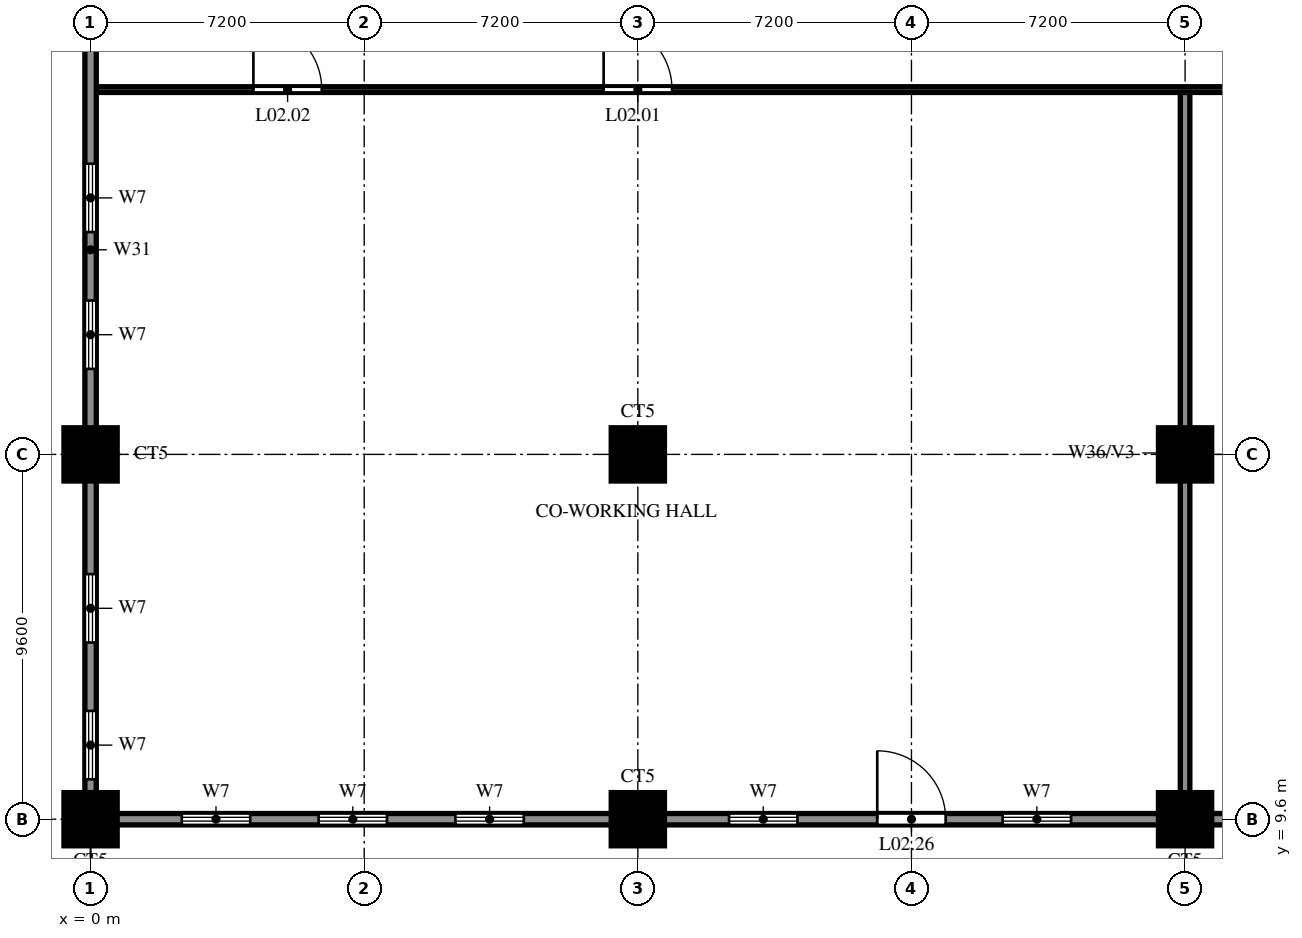
"""IFC4 building model, lengths in metres.
Left out: names, types, materials, properties, quantities, classifications, styles, units other than length and angle.
Written with IfcOpenShell. Run it as: python <this file> out.ifc"""

import sys

from ifc_helpers import new_model, si_unit, direction, frame, frame_2d, origin, origin_2d, place, context, subcontext, project, spatial, rectangle, circle, extrude, source, transform, mapped, element, fill, save


model = new_model("IFC4")
c1 = context("Model", 3, precision=1e-05, world=origin(), true_north=direction((0.0, 1.0)))
c2 = subcontext(c1, "Body", "Model", "MODEL_VIEW")
j1 = project(units=[si_unit("LENGTHUNIT", "METRE"), si_unit("PLANEANGLEUNIT", "RADIAN")], contexts=[c1])
p1 = place(None, origin())
s1 = spatial("IfcSite", under=j1, at=p1, CompositionType="ELEMENT")
p2 = place(p1, origin())
s2 = spatial("IfcBuilding", under=s1, at=p2, CompositionType="ELEMENT")
p3 = place(p2, frame((0.0, 0.0, 13.2)))
s3 = spatial("IfcBuildingStorey", under=s2, at=p3, CompositionType="ELEMENT", Elevation=13.2)
m1 = source(origin(), c2, "Body", "SweptSolid", [
    extrude(circle(Radius=0.7, at=origin_2d()), origin(), (0.0, 0.0, 1.0), 3.8),
])
for number, where, z_axis, x_axis in (
    (1, (0.0, 9.6, 0.0), (0.0, 0.0, 1.0), (1.0, 0.0, 0.0)),
    (2, (14.4, 9.6, 0.0), (0.0, 0.0, 1.0), (1.0, 0.0, 0.0)),
    (3, (28.8, 9.6, 0.0), (0.0, 0.0, 1.0), (1.0, 0.0, 0.0)),
    (4, (0.0, 19.2, 0.0), (0.0, 0.0, 1.0), (1.0, 0.0, 0.0)),
    (5, (14.4, 19.2, 0.0), (0.0, 0.0, 1.0), (1.0, 0.0, 0.0)),
    (6, (28.8, 19.2, 0.0), (0.0, 0.0, 1.0), (1.0, 0.0, 0.0)),
):
    element("IfcColumn", number, at=place(p3, frame(where, z_axis=z_axis, x_axis=x_axis)), inside=s3, PredefinedType="COLUMN", context=c2, shape_type="MappedRepresentation", body=[
        mapped(m1, transform((0.0, 0.0, 0.0))),
    ])
p4 = place(p3, frame((0.0, 9.6, 0.0), z_axis=(0.0, 0.0, 1.0), x_axis=(1.0, 0.0, 0.0)))
e7 = element("IfcWall", 7, at=p4, inside=s3, PredefinedType="SOLIDWALL", context=c2, shape_type="SweptSolid", body=[
    extrude(rectangle(XDim=100.8, YDim=0.3, at=frame_2d((50.4, 0.0))), origin(), (0.0, 0.0, 1.0), 3.8),
])
p5 = place(p4, frame((20.7, 0.0, 0.0)))
e8 = element("IfcOpeningElement", 8, at=p5, cuts=e7, PredefinedType="OPENING", context=c2, shape_type="SweptSolid", body=[
    extrude(rectangle(XDim=1.8, YDim=2.1, at=frame_2d((0.9, 1.05))), frame((0.0, 0.16, 0.0), z_axis=(0.0, -1.0, 0.0), x_axis=(1.0, 0.0, 0.0)), (0.0, 0.0, 1.0), 0.32),
])
p6 = place(p4, frame((49.2, 0.0, 0.0)))
e9 = element("IfcOpeningElement", 9, at=p6, cuts=e7, PredefinedType="OPENING", context=c2, shape_type="SweptSolid", body=[
    extrude(rectangle(XDim=2.4, YDim=2.1, at=frame_2d((1.2, 1.05))), frame((0.0, 0.16, 0.0), z_axis=(0.0, -1.0, 0.0), x_axis=(1.0, 0.0, 0.0)), (0.0, 0.0, 1.0), 0.32),
])
p7 = place(p4, frame((78.3, 0.0, 0.0)))
e10 = element("IfcOpeningElement", 10, at=p7, cuts=e7, PredefinedType="OPENING", context=c2, shape_type="SweptSolid", body=[
    extrude(rectangle(XDim=1.8, YDim=2.1, at=frame_2d((0.9, 1.05))), frame((0.0, 0.16, 0.0), z_axis=(0.0, -1.0, 0.0), x_axis=(1.0, 0.0, 0.0)), (0.0, 0.0, 1.0), 0.32),
])
p8 = place(p4, frame((2.4, 0.0, 0.6)))
e11 = element("IfcOpeningElement", 11, at=p8, cuts=e7, PredefinedType="OPENING", context=c2, shape_type="SweptSolid", body=[
    extrude(rectangle(XDim=1.8, YDim=2.4, at=frame_2d((0.9, 1.2))), frame((0.0, 0.16, 0.0), z_axis=(0.0, -1.0, 0.0), x_axis=(1.0, 0.0, 0.0)), (0.0, 0.0, 1.0), 0.32),
])
p9 = place(p4, frame((6.0, 0.0, 0.6)))
e12 = element("IfcOpeningElement", 12, at=p9, cuts=e7, PredefinedType="OPENING", context=c2, shape_type="SweptSolid", body=[
    extrude(rectangle(XDim=1.8, YDim=2.4, at=frame_2d((0.9, 1.2))), frame((0.0, 0.16, 0.0), z_axis=(0.0, -1.0, 0.0), x_axis=(1.0, 0.0, 0.0)), (0.0, 0.0, 1.0), 0.32),
])
p10 = place(p4, frame((9.6, 0.0, 0.6)))
e13 = element("IfcOpeningElement", 13, at=p10, cuts=e7, PredefinedType="OPENING", context=c2, shape_type="SweptSolid", body=[
    extrude(rectangle(XDim=1.8, YDim=2.4, at=frame_2d((0.9, 1.2))), frame((0.0, 0.16, 0.0), z_axis=(0.0, -1.0, 0.0), x_axis=(1.0, 0.0, 0.0)), (0.0, 0.0, 1.0), 0.32),
])
p11 = place(p4, frame((16.8, 0.0, 0.6)))
e14 = element("IfcOpeningElement", 14, at=p11, cuts=e7, PredefinedType="OPENING", context=c2, shape_type="SweptSolid", body=[
    extrude(rectangle(XDim=1.8, YDim=2.4, at=frame_2d((0.9, 1.2))), frame((0.0, 0.16, 0.0), z_axis=(0.0, -1.0, 0.0), x_axis=(1.0, 0.0, 0.0)), (0.0, 0.0, 1.0), 0.32),
])
p12 = place(p4, frame((24.0, 0.0, 0.6)))
e15 = element("IfcOpeningElement", 15, at=p12, cuts=e7, PredefinedType="OPENING", context=c2, shape_type="SweptSolid", body=[
    extrude(rectangle(XDim=1.8, YDim=2.4, at=frame_2d((0.9, 1.2))), frame((0.0, 0.16, 0.0), z_axis=(0.0, -1.0, 0.0), x_axis=(1.0, 0.0, 0.0)), (0.0, 0.0, 1.0), 0.32),
])
p13 = place(p4, frame((31.2, 0.0, 0.6)))
e16 = element("IfcOpeningElement", 16, at=p13, cuts=e7, PredefinedType="OPENING", context=c2, shape_type="SweptSolid", body=[
    extrude(rectangle(XDim=1.8, YDim=2.4, at=frame_2d((0.9, 1.2))), frame((0.0, 0.16, 0.0), z_axis=(0.0, -1.0, 0.0), x_axis=(1.0, 0.0, 0.0)), (0.0, 0.0, 1.0), 0.32),
])
p14 = place(p4, frame((34.8, 0.0, 0.6)))
e17 = element("IfcOpeningElement", 17, at=p14, cuts=e7, PredefinedType="OPENING", context=c2, shape_type="SweptSolid", body=[
    extrude(rectangle(XDim=1.8, YDim=2.4, at=frame_2d((0.9, 1.2))), frame((0.0, 0.16, 0.0), z_axis=(0.0, -1.0, 0.0), x_axis=(1.0, 0.0, 0.0)), (0.0, 0.0, 1.0), 0.32),
])
p15 = place(p4, frame((38.4, 0.0, 0.6)))
e18 = element("IfcOpeningElement", 18, at=p15, cuts=e7, PredefinedType="OPENING", context=c2, shape_type="SweptSolid", body=[
    extrude(rectangle(XDim=1.8, YDim=2.4, at=frame_2d((0.9, 1.2))), frame((0.0, 0.16, 0.0), z_axis=(0.0, -1.0, 0.0), x_axis=(1.0, 0.0, 0.0)), (0.0, 0.0, 1.0), 0.32),
])
p16 = place(p4, frame((45.6, 0.0, 0.6)))
e19 = element("IfcOpeningElement", 19, at=p16, cuts=e7, PredefinedType="OPENING", context=c2, shape_type="SweptSolid", body=[
    extrude(rectangle(XDim=1.8, YDim=2.4, at=frame_2d((0.9, 1.2))), frame((0.0, 0.16, 0.0), z_axis=(0.0, -1.0, 0.0), x_axis=(1.0, 0.0, 0.0)), (0.0, 0.0, 1.0), 0.32),
])
p17 = place(p4, frame((52.8, 0.0, 0.6)))
e20 = element("IfcOpeningElement", 20, at=p17, cuts=e7, PredefinedType="OPENING", context=c2, shape_type="SweptSolid", body=[
    extrude(rectangle(XDim=1.8, YDim=2.4, at=frame_2d((0.9, 1.2))), frame((0.0, 0.16, 0.0), z_axis=(0.0, -1.0, 0.0), x_axis=(1.0, 0.0, 0.0)), (0.0, 0.0, 1.0), 0.32),
])
p18 = place(p4, frame((60.0, 0.0, 0.6)))
e21 = element("IfcOpeningElement", 21, at=p18, cuts=e7, PredefinedType="OPENING", context=c2, shape_type="SweptSolid", body=[
    extrude(rectangle(XDim=1.8, YDim=2.4, at=frame_2d((0.9, 1.2))), frame((0.0, 0.16, 0.0), z_axis=(0.0, -1.0, 0.0), x_axis=(1.0, 0.0, 0.0)), (0.0, 0.0, 1.0), 0.32),
])
p19 = place(p4, frame((63.6, 0.0, 0.6)))
e22 = element("IfcOpeningElement", 22, at=p19, cuts=e7, PredefinedType="OPENING", context=c2, shape_type="SweptSolid", body=[
    extrude(rectangle(XDim=1.8, YDim=2.4, at=frame_2d((0.9, 1.2))), frame((0.0, 0.16, 0.0), z_axis=(0.0, -1.0, 0.0), x_axis=(1.0, 0.0, 0.0)), (0.0, 0.0, 1.0), 0.32),
])
p20 = place(p4, frame((67.2, 0.0, 0.6)))
e23 = element("IfcOpeningElement", 23, at=p20, cuts=e7, PredefinedType="OPENING", context=c2, shape_type="SweptSolid", body=[
    extrude(rectangle(XDim=1.8, YDim=2.4, at=frame_2d((0.9, 1.2))), frame((0.0, 0.16, 0.0), z_axis=(0.0, -1.0, 0.0), x_axis=(1.0, 0.0, 0.0)), (0.0, 0.0, 1.0), 0.32),
])
p21 = place(p4, frame((74.4, 0.0, 0.6)))
e24 = element("IfcOpeningElement", 24, at=p21, cuts=e7, PredefinedType="OPENING", context=c2, shape_type="SweptSolid", body=[
    extrude(rectangle(XDim=1.8, YDim=2.4, at=frame_2d((0.9, 1.2))), frame((0.0, 0.16, 0.0), z_axis=(0.0, -1.0, 0.0), x_axis=(1.0, 0.0, 0.0)), (0.0, 0.0, 1.0), 0.32),
])
p22 = place(p4, frame((81.6, 0.0, 0.6)))
e25 = element("IfcOpeningElement", 25, at=p22, cuts=e7, PredefinedType="OPENING", context=c2, shape_type="SweptSolid", body=[
    extrude(rectangle(XDim=1.8, YDim=2.4, at=frame_2d((0.9, 1.2))), frame((0.0, 0.16, 0.0), z_axis=(0.0, -1.0, 0.0), x_axis=(1.0, 0.0, 0.0)), (0.0, 0.0, 1.0), 0.32),
])
p23 = place(p4, frame((88.8, 0.0, 0.6)))
e26 = element("IfcOpeningElement", 26, at=p23, cuts=e7, PredefinedType="OPENING", context=c2, shape_type="SweptSolid", body=[
    extrude(rectangle(XDim=1.8, YDim=2.4, at=frame_2d((0.9, 1.2))), frame((0.0, 0.16, 0.0), z_axis=(0.0, -1.0, 0.0), x_axis=(1.0, 0.0, 0.0)), (0.0, 0.0, 1.0), 0.32),
])
p24 = place(p4, frame((92.4, 0.0, 0.6)))
e27 = element("IfcOpeningElement", 27, at=p24, cuts=e7, PredefinedType="OPENING", context=c2, shape_type="SweptSolid", body=[
    extrude(rectangle(XDim=1.8, YDim=2.4, at=frame_2d((0.9, 1.2))), frame((0.0, 0.16, 0.0), z_axis=(0.0, -1.0, 0.0), x_axis=(1.0, 0.0, 0.0)), (0.0, 0.0, 1.0), 0.32),
])
p25 = place(p4, frame((96.0, 0.0, 0.6)))
e28 = element("IfcOpeningElement", 28, at=p25, cuts=e7, PredefinedType="OPENING", context=c2, shape_type="SweptSolid", body=[
    extrude(rectangle(XDim=1.8, YDim=2.4, at=frame_2d((0.9, 1.2))), frame((0.0, 0.16, 0.0), z_axis=(0.0, -1.0, 0.0), x_axis=(1.0, 0.0, 0.0)), (0.0, 0.0, 1.0), 0.32),
])
p26 = place(p3, frame((0.15, 28.8, 0.0), z_axis=(0.0, 0.0, 1.0), x_axis=(1.0, 0.0, 0.0)))
e29 = element("IfcWall", 29, at=p26, inside=s3, PredefinedType="PARTITIONING", context=c2, shape_type="SweptSolid", body=[
    extrude(rectangle(XDim=100.5, YDim=0.15, at=frame_2d((50.25, 0.0))), origin(), (0.0, 0.0, 1.0), 2.6),
])
p27 = place(p26, frame((13.35, 0.0, 0.0)))
e30 = element("IfcOpeningElement", 30, at=p27, cuts=e29, PredefinedType="OPENING", context=c2, shape_type="SweptSolid", body=[
    extrude(rectangle(XDim=1.8, YDim=2.1, at=frame_2d((0.9, 1.05))), frame((0.0, 0.085, 0.0), z_axis=(0.0, -1.0, 0.0), x_axis=(1.0, 0.0, 0.0)), (0.0, 0.0, 1.0), 0.17),
])
p28 = place(p26, frame((4.134, 0.0, 0.0)))
e31 = element("IfcOpeningElement", 31, at=p28, cuts=e29, PredefinedType="OPENING", context=c2, shape_type="SweptSolid", body=[
    extrude(rectangle(XDim=1.8, YDim=2.1, at=frame_2d((0.9, 1.05))), frame((0.0, 0.085, 0.0), z_axis=(0.0, -1.0, 0.0), x_axis=(1.0, 0.0, 0.0)), (0.0, 0.0, 1.0), 0.17),
])
p29 = place(p26, frame((34.95, 0.0, 0.0)))
e32 = element("IfcOpeningElement", 32, at=p29, cuts=e29, PredefinedType="OPENING", context=c2, shape_type="SweptSolid", body=[
    extrude(rectangle(XDim=1.8, YDim=2.1, at=frame_2d((0.9, 1.05))), frame((0.0, 0.085, 0.0), z_axis=(0.0, -1.0, 0.0), x_axis=(1.0, 0.0, 0.0)), (0.0, 0.0, 1.0), 0.17),
])
p30 = place(p26, frame((30.342, 0.0, 0.0)))
e33 = element("IfcOpeningElement", 33, at=p30, cuts=e29, PredefinedType="OPENING", context=c2, shape_type="SweptSolid", body=[
    extrude(rectangle(XDim=1.8, YDim=2.1, at=frame_2d((0.9, 1.05))), frame((0.0, 0.085, 0.0), z_axis=(0.0, -1.0, 0.0), x_axis=(1.0, 0.0, 0.0)), (0.0, 0.0, 1.0), 0.17),
])
p31 = place(p26, frame((56.55, 0.0, 0.0)))
e34 = element("IfcOpeningElement", 34, at=p31, cuts=e29, PredefinedType="OPENING", context=c2, shape_type="SweptSolid", body=[
    extrude(rectangle(XDim=1.8, YDim=2.1, at=frame_2d((0.9, 1.05))), frame((0.0, 0.085, 0.0), z_axis=(0.0, -1.0, 0.0), x_axis=(1.0, 0.0, 0.0)), (0.0, 0.0, 1.0), 0.17),
])
p32 = place(p26, frame((47.334, 0.0, 0.0)))
e35 = element("IfcOpeningElement", 35, at=p32, cuts=e29, PredefinedType="OPENING", context=c2, shape_type="SweptSolid", body=[
    extrude(rectangle(XDim=1.8, YDim=2.1, at=frame_2d((0.9, 1.05))), frame((0.0, 0.085, 0.0), z_axis=(0.0, -1.0, 0.0), x_axis=(1.0, 0.0, 0.0)), (0.0, 0.0, 1.0), 0.17),
])
p33 = place(p26, frame((85.35, 0.0, 0.0)))
e36 = element("IfcOpeningElement", 36, at=p33, cuts=e29, PredefinedType="OPENING", context=c2, shape_type="SweptSolid", body=[
    extrude(rectangle(XDim=1.8, YDim=2.1, at=frame_2d((0.9, 1.05))), frame((0.0, 0.085, 0.0), z_axis=(0.0, -1.0, 0.0), x_axis=(1.0, 0.0, 0.0)), (0.0, 0.0, 1.0), 0.17),
])
p34 = place(p26, frame((76.134, 0.0, 0.0)))
e37 = element("IfcOpeningElement", 37, at=p34, cuts=e29, PredefinedType="OPENING", context=c2, shape_type="SweptSolid", body=[
    extrude(rectangle(XDim=1.8, YDim=2.1, at=frame_2d((0.9, 1.05))), frame((0.0, 0.085, 0.0), z_axis=(0.0, -1.0, 0.0), x_axis=(1.0, 0.0, 0.0)), (0.0, 0.0, 1.0), 0.17),
])
p35 = place(p3, frame((0.0, 9.6, 0.0), z_axis=(0.0, 0.0, 1.0), x_axis=(0.0, 1.0, 0.0)))
e38 = element("IfcWall", 38, at=p35, inside=s3, PredefinedType="SOLIDWALL", context=c2, shape_type="SweptSolid", body=[
    extrude(rectangle(XDim=33.3, YDim=0.3, at=frame_2d((16.65, 0.0))), origin(), (0.0, 0.0, 1.0), 3.8),
])
p36 = place(p35, frame((1.05, 0.0, 0.6)))
e39 = element("IfcOpeningElement", 39, at=p36, cuts=e38, PredefinedType="OPENING", context=c2, shape_type="SweptSolid", body=[
    extrude(rectangle(XDim=1.8, YDim=2.4, at=frame_2d((0.9, 1.2))), frame((0.0, 0.16, 0.0), z_axis=(0.0, -1.0, 0.0), x_axis=(1.0, 0.0, 0.0)), (0.0, 0.0, 1.0), 0.32),
])
p37 = place(p35, frame((4.65, 0.0, 0.6)))
e40 = element("IfcOpeningElement", 40, at=p37, cuts=e38, PredefinedType="OPENING", context=c2, shape_type="SweptSolid", body=[
    extrude(rectangle(XDim=1.8, YDim=2.4, at=frame_2d((0.9, 1.2))), frame((0.0, 0.16, 0.0), z_axis=(0.0, -1.0, 0.0), x_axis=(1.0, 0.0, 0.0)), (0.0, 0.0, 1.0), 0.32),
])
p38 = place(p35, frame((11.85, 0.0, 0.6)))
e41 = element("IfcOpeningElement", 41, at=p38, cuts=e38, PredefinedType="OPENING", context=c2, shape_type="SweptSolid", body=[
    extrude(rectangle(XDim=1.8, YDim=2.4, at=frame_2d((0.9, 1.2))), frame((0.0, 0.16, 0.0), z_axis=(0.0, -1.0, 0.0), x_axis=(1.0, 0.0, 0.0)), (0.0, 0.0, 1.0), 0.32),
])
p39 = place(p35, frame((15.45, 0.0, 0.6)))
e42 = element("IfcOpeningElement", 42, at=p39, cuts=e38, PredefinedType="OPENING", context=c2, shape_type="SweptSolid", body=[
    extrude(rectangle(XDim=1.8, YDim=2.4, at=frame_2d((0.9, 1.2))), frame((0.0, 0.16, 0.0), z_axis=(0.0, -1.0, 0.0), x_axis=(1.0, 0.0, 0.0)), (0.0, 0.0, 1.0), 0.32),
])
p40 = place(p35, frame((26.25, 0.0, 0.6)))
e43 = element("IfcOpeningElement", 43, at=p40, cuts=e38, PredefinedType="OPENING", context=c2, shape_type="SweptSolid", body=[
    extrude(rectangle(XDim=1.8, YDim=2.4, at=frame_2d((0.9, 1.2))), frame((0.0, 0.16, 0.0), z_axis=(0.0, -1.0, 0.0), x_axis=(1.0, 0.0, 0.0)), (0.0, 0.0, 1.0), 0.32),
])
p41 = place(p35, frame((29.85, 0.0, 0.6)))
e44 = element("IfcOpeningElement", 44, at=p41, cuts=e38, PredefinedType="OPENING", context=c2, shape_type="SweptSolid", body=[
    extrude(rectangle(XDim=1.8, YDim=2.4, at=frame_2d((0.9, 1.2))), frame((0.0, 0.16, 0.0), z_axis=(0.0, -1.0, 0.0), x_axis=(1.0, 0.0, 0.0)), (0.0, 0.0, 1.0), 0.32),
])
p42 = place(p3, frame((28.8, 9.75, 0.0), z_axis=(0.0, 0.0, 1.0), x_axis=(0.0, 1.0, 0.0)))
e45 = element("IfcWall", 45, at=p42, inside=s3, PredefinedType="SOLIDWALL", context=c2, shape_type="SweptSolid", body=[
    extrude(rectangle(XDim=18.975, YDim=0.25, at=frame_2d((9.488, 0.0))), origin(), (0.0, 0.0, 1.0), 2.6),
])
p43 = place(p27, origin())
e46 = element("IfcDoor", 46, at=p43, inside=s3, OperationType="DOUBLE_DOOR_SINGLE_SWING", PredefinedType="DOOR", context=c2, shape_type="SweptSolid", body=[
    extrude(rectangle(XDim=1.8, YDim=2.1, at=frame_2d((0.9, 1.05))), frame((0.0, 0.025, 0.0), z_axis=(0.0, -1.0, 0.0), x_axis=(1.0, 0.0, 0.0)), (0.0, 0.0, 1.0), 0.05),
])
fill(e30, e46)
p44 = place(p28, origin())
e47 = element("IfcDoor", 47, at=p44, inside=s3, OperationType="DOUBLE_DOOR_SINGLE_SWING", PredefinedType="DOOR", context=c2, shape_type="SweptSolid", body=[
    extrude(rectangle(XDim=1.8, YDim=2.1, at=frame_2d((0.9, 1.05))), frame((0.0, 0.025, 0.0), z_axis=(0.0, -1.0, 0.0), x_axis=(1.0, 0.0, 0.0)), (0.0, 0.0, 1.0), 0.05),
])
fill(e31, e47)
p45 = place(p5, origin())
e48 = element("IfcDoor", 48, at=p45, inside=s3, OperationType="DOUBLE_DOOR_SINGLE_SWING", PredefinedType="DOOR", context=c2, shape_type="SweptSolid", body=[
    extrude(rectangle(XDim=1.8, YDim=2.1, at=frame_2d((0.9, 1.05))), frame((0.0, 0.025, 0.0), z_axis=(0.0, -1.0, 0.0), x_axis=(1.0, 0.0, 0.0)), (0.0, 0.0, 1.0), 0.05),
])
fill(e8, e48)
p46 = place(p8, origin())
e49 = element("IfcWindow", 49, at=p46, inside=s3, PartitioningType="DOUBLE_PANEL_VERTICAL", PredefinedType="WINDOW", context=c2, shape_type="SweptSolid", body=[
    extrude(rectangle(XDim=1.8, YDim=2.4, at=frame_2d((0.9, 1.2))), frame((0.0, 0.03, 0.0), z_axis=(0.0, -1.0, 0.0), x_axis=(1.0, 0.0, 0.0)), (0.0, 0.0, 1.0), 0.06),
])
fill(e11, e49)
p47 = place(p9, origin())
e50 = element("IfcWindow", 50, at=p47, inside=s3, PartitioningType="DOUBLE_PANEL_VERTICAL", PredefinedType="WINDOW", context=c2, shape_type="SweptSolid", body=[
    extrude(rectangle(XDim=1.8, YDim=2.4, at=frame_2d((0.9, 1.2))), frame((0.0, 0.03, 0.0), z_axis=(0.0, -1.0, 0.0), x_axis=(1.0, 0.0, 0.0)), (0.0, 0.0, 1.0), 0.06),
])
fill(e12, e50)
p48 = place(p10, origin())
e51 = element("IfcWindow", 51, at=p48, inside=s3, PartitioningType="DOUBLE_PANEL_VERTICAL", PredefinedType="WINDOW", context=c2, shape_type="SweptSolid", body=[
    extrude(rectangle(XDim=1.8, YDim=2.4, at=frame_2d((0.9, 1.2))), frame((0.0, 0.03, 0.0), z_axis=(0.0, -1.0, 0.0), x_axis=(1.0, 0.0, 0.0)), (0.0, 0.0, 1.0), 0.06),
])
fill(e13, e51)
p49 = place(p11, origin())
e52 = element("IfcWindow", 52, at=p49, inside=s3, PartitioningType="DOUBLE_PANEL_VERTICAL", PredefinedType="WINDOW", context=c2, shape_type="SweptSolid", body=[
    extrude(rectangle(XDim=1.8, YDim=2.4, at=frame_2d((0.9, 1.2))), frame((0.0, 0.03, 0.0), z_axis=(0.0, -1.0, 0.0), x_axis=(1.0, 0.0, 0.0)), (0.0, 0.0, 1.0), 0.06),
])
fill(e14, e52)
p50 = place(p12, origin())
e53 = element("IfcWindow", 53, at=p50, inside=s3, PartitioningType="DOUBLE_PANEL_VERTICAL", PredefinedType="WINDOW", context=c2, shape_type="SweptSolid", body=[
    extrude(rectangle(XDim=1.8, YDim=2.4, at=frame_2d((0.9, 1.2))), frame((0.0, 0.03, 0.0), z_axis=(0.0, -1.0, 0.0), x_axis=(1.0, 0.0, 0.0)), (0.0, 0.0, 1.0), 0.06),
])
fill(e15, e53)
p51 = place(p36, origin())
e54 = element("IfcWindow", 54, at=p51, inside=s3, PartitioningType="DOUBLE_PANEL_VERTICAL", PredefinedType="WINDOW", context=c2, shape_type="SweptSolid", body=[
    extrude(rectangle(XDim=1.8, YDim=2.4, at=frame_2d((0.9, 1.2))), frame((0.0, 0.03, 0.0), z_axis=(0.0, -1.0, 0.0), x_axis=(1.0, 0.0, 0.0)), (0.0, 0.0, 1.0), 0.06),
])
fill(e39, e54)
p52 = place(p37, origin())
e55 = element("IfcWindow", 55, at=p52, inside=s3, PartitioningType="DOUBLE_PANEL_VERTICAL", PredefinedType="WINDOW", context=c2, shape_type="SweptSolid", body=[
    extrude(rectangle(XDim=1.8, YDim=2.4, at=frame_2d((0.9, 1.2))), frame((0.0, 0.03, 0.0), z_axis=(0.0, -1.0, 0.0), x_axis=(1.0, 0.0, 0.0)), (0.0, 0.0, 1.0), 0.06),
])
fill(e40, e55)
p53 = place(p38, origin())
e56 = element("IfcWindow", 56, at=p53, inside=s3, PartitioningType="DOUBLE_PANEL_VERTICAL", PredefinedType="WINDOW", context=c2, shape_type="SweptSolid", body=[
    extrude(rectangle(XDim=1.8, YDim=2.4, at=frame_2d((0.9, 1.2))), frame((0.0, 0.03, 0.0), z_axis=(0.0, -1.0, 0.0), x_axis=(1.0, 0.0, 0.0)), (0.0, 0.0, 1.0), 0.06),
])
fill(e41, e56)
p54 = place(p39, origin())
e57 = element("IfcWindow", 57, at=p54, inside=s3, PartitioningType="DOUBLE_PANEL_VERTICAL", PredefinedType="WINDOW", context=c2, shape_type="SweptSolid", body=[
    extrude(rectangle(XDim=1.8, YDim=2.4, at=frame_2d((0.9, 1.2))), frame((0.0, 0.03, 0.0), z_axis=(0.0, -1.0, 0.0), x_axis=(1.0, 0.0, 0.0)), (0.0, 0.0, 1.0), 0.06),
])
fill(e42, e57)
save(model, sys.argv[1])
